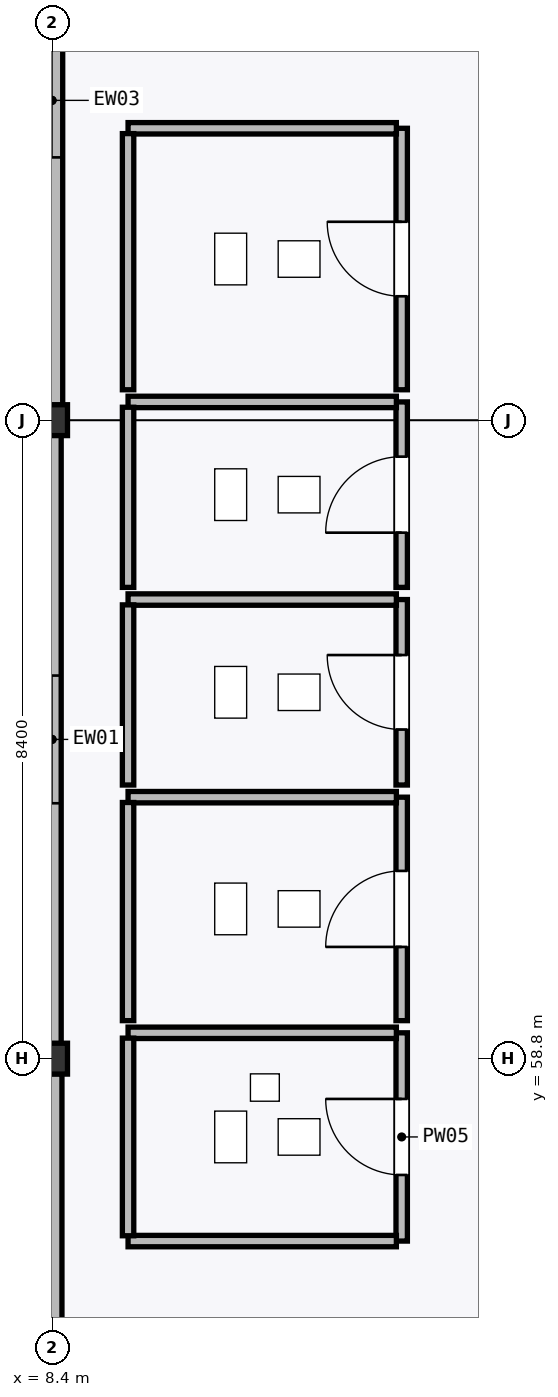
"""IFC4 building model, lengths in metres.
Left out: names, types, materials, properties, quantities, classifications, styles, units other than length and angle.
Written with IfcOpenShell. Run it as: python <this file> out.ifc"""

import sys

from ifc_helpers import new_model, si_unit, direction, frame, frame_2d, origin, origin_2d, place, context, subcontext, project, spatial, rectangle, hollow_circle, extrude, element, fill, save


model = new_model("IFC4")
c1 = context("Model", 3, precision=1e-05, world=origin(), true_north=direction((0.0, 1.0)))
c2 = subcontext(c1, "Body", "Model", "MODEL_VIEW")
j1 = project(units=[si_unit("LENGTHUNIT", "METRE"), si_unit("PLANEANGLEUNIT", "RADIAN")], contexts=[c1])
p1 = place(None, origin())
s1 = spatial("IfcSite", under=j1, at=p1, CompositionType="ELEMENT")
p2 = place(p1, origin())
s2 = spatial("IfcBuilding", under=s1, at=p2, CompositionType="ELEMENT")
p3 = place(p2, frame((0.0, 0.0, 6.0)))
s3 = spatial("IfcBuildingStorey", under=s2, at=p3, CompositionType="ELEMENT", Elevation=6.0)
for number, where, z_axis, x_axis in (
    (1, (8.4, 58.8, 0.0), (0.0, 0.0, 1.0), (1.0, 0.0, 0.0)),
    (2, (8.4, 67.2, 0.0), (0.0, 0.0, 1.0), (1.0, 0.0, 0.0)),
):
    element("IfcColumn", number, at=place(p3, frame(where, z_axis=z_axis, x_axis=x_axis)), inside=s3, PredefinedType="COLUMN", context=c2, shape_type="SweptSolid", body=[
        extrude(hollow_circle(Radius=0.203, WallThickness=0.016, at=origin_2d()), origin(), (0.0, 0.0, 1.0), 5.4),
    ])
p4 = place(p3, frame((8.4, 75.417, 0.0), z_axis=(0.0, 0.0, 1.0), x_axis=(0.0, -1.0, 0.0)))
e3 = element("IfcWall", 3, at=p4, inside=s3, PredefinedType="STANDARD", context=c2, shape_type="SweptSolid", body=[
    extrude(rectangle(XDim=8.019, YDim=0.28, at=frame_2d((4.009, 0.0))), origin(), (0.0, 0.0, 1.0), 4.697),
])
p5 = place(p4, frame((3.259, 0.0, 0.95)))
e4 = element("IfcOpeningElement", 4, at=p5, cuts=e3, PredefinedType="OPENING", context=c2, shape_type="SweptSolid", body=[
    extrude(rectangle(XDim=1.5, YDim=2.4, at=frame_2d((0.75, 1.2))), frame((0.0, 0.15, 0.0), z_axis=(0.0, -1.0, 0.0), x_axis=(1.0, 0.0, 0.0)), (0.0, 0.0, 1.0), 0.3),
])
p6 = place(p3, frame((8.4, 67.002, 0.0), z_axis=(0.0, 0.0, 1.0), x_axis=(0.0, -1.0, 0.0)))
e5 = element("IfcWall", 5, at=p6, inside=s3, PredefinedType="STANDARD", context=c2, shape_type="SweptSolid", body=[
    extrude(rectangle(XDim=8.004, YDim=0.24, at=frame_2d((4.002, 0.0))), origin(), (0.0, 0.0, 1.0), 4.697),
])
p7 = place(p6, frame((3.162, 0.0, 0.95)))
e6 = element("IfcOpeningElement", 6, at=p7, cuts=e5, PredefinedType="OPENING", context=c2, shape_type="SweptSolid", body=[
    extrude(rectangle(XDim=1.68, YDim=2.4, at=frame_2d((0.84, 1.2))), frame((0.0, 0.13, 0.0), z_axis=(0.0, -1.0, 0.0), x_axis=(1.0, 0.0, 0.0)), (0.0, 0.0, 1.0), 0.26),
])
p8 = place(p3, frame((8.4, 58.602, 0.0), z_axis=(0.0, 0.0, 1.0), x_axis=(0.0, -1.0, 0.0)))
e7 = element("IfcWall", 7, at=p8, inside=s3, PredefinedType="STANDARD", context=c2, shape_type="SweptSolid", body=[
    extrude(rectangle(XDim=8.019, YDim=0.26, at=frame_2d((4.009, 0.0))), origin(), (0.0, 0.0, 1.0), 4.697),
])
p9 = place(p8, frame((4.552, 0.0, 0.95)))
e8 = element("IfcOpeningElement", 8, at=p9, cuts=e7, PredefinedType="OPENING", context=c2, shape_type="SweptSolid", body=[
    extrude(rectangle(XDim=1.8, YDim=2.4, at=frame_2d((0.9, 1.2))), frame((0.0, 0.14, 0.0), z_axis=(0.0, -1.0, 0.0), x_axis=(1.0, 0.0, 0.0)), (0.0, 0.0, 1.0), 0.28),
])
p10 = place(p3, frame((13.0, 56.4, 0.0), z_axis=(0.0, 0.0, 1.0), x_axis=(0.0, 1.0, 0.0)))
e9 = element("IfcWall", 9, at=p10, inside=s3, PredefinedType="PARTITIONING", context=c2, shape_type="SweptSolid", body=[
    extrude(rectangle(XDim=2.74, YDim=0.15, at=frame_2d((1.37, 0.0))), origin(), (0.0, 0.0, 1.0), 5.145),
])
p11 = place(p10, frame((0.87, 0.0, 0.0)))
e10 = element("IfcOpeningElement", 10, at=p11, cuts=e9, PredefinedType="OPENING", context=c2, shape_type="SweptSolid", body=[
    extrude(rectangle(XDim=1.0, YDim=2.1, at=frame_2d((0.5, 1.05))), frame((0.0, 0.085, 0.0), z_axis=(0.0, -1.0, 0.0), x_axis=(1.0, 0.0, 0.0)), (0.0, 0.0, 1.0), 0.17),
])
p12 = place(p3, frame((9.4, 56.4, 0.0), z_axis=(0.0, 0.0, 1.0), x_axis=(1.0, 0.0, 0.0)))
e11 = element("IfcWall", 11, at=p12, inside=s3, PredefinedType="PARTITIONING", context=c2, shape_type="SweptSolid", body=[
    extrude(rectangle(XDim=3.53, YDim=0.15, at=frame_2d((1.765, 0.0))), origin(), (0.0, 0.0, 1.0), 5.145),
])
p13 = place(p3, frame((12.93, 59.14, 0.0), z_axis=(0.0, 0.0, 1.0), x_axis=(-1.0, 0.0, 0.0)))
e12 = element("IfcWall", 12, at=p13, inside=s3, PredefinedType="PARTITIONING", context=c2, shape_type="SweptSolid", body=[
    extrude(rectangle(XDim=3.53, YDim=0.15, at=frame_2d((1.765, 0.0))), origin(), (0.0, 0.0, 1.0), 4.237),
])
p14 = place(p3, frame((9.4, 59.07, 0.0), z_axis=(0.0, 0.0, 1.0), x_axis=(0.0, -1.0, 0.0)))
e13 = element("IfcWall", 13, at=p14, inside=s3, PredefinedType="PARTITIONING", context=c2, shape_type="SweptSolid", body=[
    extrude(rectangle(XDim=2.6, YDim=0.15, at=frame_2d((1.3, 0.0))), origin(), (0.0, 0.0, 1.0), 5.145),
])
p15 = place(p3, frame((13.0, 59.3, 0.0), z_axis=(0.0, 0.0, 1.0), x_axis=(0.0, 1.0, 0.0)))
e14 = element("IfcWall", 14, at=p15, inside=s3, PredefinedType="PARTITIONING", context=c2, shape_type="SweptSolid", body=[
    extrude(rectangle(XDim=2.94, YDim=0.15, at=frame_2d((1.47, 0.0))), origin(), (0.0, 0.0, 1.0), 5.145),
])
p16 = place(p15, frame((0.97, 0.0, 0.0)))
e15 = element("IfcOpeningElement", 15, at=p16, cuts=e14, PredefinedType="OPENING", context=c2, shape_type="SweptSolid", body=[
    extrude(rectangle(XDim=1.0, YDim=2.1, at=frame_2d((0.5, 1.05))), frame((0.0, 0.085, 0.0), z_axis=(0.0, -1.0, 0.0), x_axis=(1.0, 0.0, 0.0)), (0.0, 0.0, 1.0), 0.17),
])
p17 = place(p3, frame((12.93, 62.24, 0.0), z_axis=(0.0, 0.0, 1.0), x_axis=(-1.0, 0.0, 0.0)))
e16 = element("IfcWall", 16, at=p17, inside=s3, PredefinedType="PARTITIONING", context=c2, shape_type="SweptSolid", body=[
    extrude(rectangle(XDim=3.53, YDim=0.15, at=frame_2d((1.765, 0.0))), origin(), (0.0, 0.0, 1.0), 5.145),
])
p18 = place(p3, frame((9.4, 62.17, 0.0), z_axis=(0.0, 0.0, 1.0), x_axis=(0.0, -1.0, 0.0)))
e17 = element("IfcWall", 17, at=p18, inside=s3, PredefinedType="PARTITIONING", context=c2, shape_type="SweptSolid", body=[
    extrude(rectangle(XDim=2.87, YDim=0.15, at=frame_2d((1.435, 0.0))), origin(), (0.0, 0.0, 1.0), 5.145),
])
p19 = place(p3, frame((13.0, 62.4, 0.0), z_axis=(0.0, 0.0, 1.0), x_axis=(0.0, 1.0, 0.0)))
e18 = element("IfcWall", 18, at=p19, inside=s3, PredefinedType="PARTITIONING", context=c2, shape_type="SweptSolid", body=[
    extrude(rectangle(XDim=2.44, YDim=0.15, at=frame_2d((1.22, 0.0))), origin(), (0.0, 0.0, 1.0), 5.145),
])
p20 = place(p19, frame((0.73, 0.0, 0.0)))
e19 = element("IfcOpeningElement", 19, at=p20, cuts=e18, PredefinedType="OPENING", context=c2, shape_type="SweptSolid", body=[
    extrude(rectangle(XDim=0.98, YDim=2.1, at=frame_2d((0.49, 1.05))), frame((0.0, 0.085, 0.0), z_axis=(0.0, -1.0, 0.0), x_axis=(1.0, 0.0, 0.0)), (0.0, 0.0, 1.0), 0.17),
])
p21 = place(p3, frame((12.93, 64.84, 0.0), z_axis=(0.0, 0.0, 1.0), x_axis=(-1.0, 0.0, 0.0)))
e20 = element("IfcWall", 20, at=p21, inside=s3, PredefinedType="PARTITIONING", context=c2, shape_type="SweptSolid", body=[
    extrude(rectangle(XDim=3.53, YDim=0.15, at=frame_2d((1.765, 0.0))), origin(), (0.0, 0.0, 1.0), 5.145),
])
p22 = place(p3, frame((9.4, 64.77, 0.0), z_axis=(0.0, 0.0, 1.0), x_axis=(0.0, -1.0, 0.0)))
e21 = element("IfcWall", 21, at=p22, inside=s3, PredefinedType="PARTITIONING", context=c2, shape_type="SweptSolid", body=[
    extrude(rectangle(XDim=2.37, YDim=0.15, at=frame_2d((1.185, 0.0))), origin(), (0.0, 0.0, 1.0), 5.145),
])
p23 = place(p3, frame((13.0, 65.0, 0.0), z_axis=(0.0, 0.0, 1.0), x_axis=(0.0, 1.0, 0.0)))
e22 = element("IfcWall", 22, at=p23, inside=s3, PredefinedType="PARTITIONING", context=c2, shape_type="SweptSolid", body=[
    extrude(rectangle(XDim=2.44, YDim=0.15, at=frame_2d((1.22, 0.0))), origin(), (0.0, 0.0, 1.0), 5.145),
])
p24 = place(p23, frame((0.72, 0.0, 0.0)))
e23 = element("IfcOpeningElement", 23, at=p24, cuts=e22, PredefinedType="OPENING", context=c2, shape_type="SweptSolid", body=[
    extrude(rectangle(XDim=1.0, YDim=2.1, at=frame_2d((0.5, 1.05))), frame((0.0, 0.085, 0.0), z_axis=(0.0, -1.0, 0.0), x_axis=(1.0, 0.0, 0.0)), (0.0, 0.0, 1.0), 0.17),
])
p25 = place(p3, frame((12.93, 67.44, 0.0), z_axis=(0.0, 0.0, 1.0), x_axis=(-1.0, 0.0, 0.0)))
e24 = element("IfcWall", 24, at=p25, inside=s3, PredefinedType="PARTITIONING", context=c2, shape_type="SweptSolid", body=[
    extrude(rectangle(XDim=3.53, YDim=0.15, at=frame_2d((1.765, 0.0))), origin(), (0.0, 0.0, 1.0), 4.549),
])
p26 = place(p3, frame((9.4, 67.37, 0.0), z_axis=(0.0, 0.0, 1.0), x_axis=(0.0, -1.0, 0.0)))
e25 = element("IfcWall", 25, at=p26, inside=s3, PredefinedType="PARTITIONING", context=c2, shape_type="SweptSolid", body=[
    extrude(rectangle(XDim=2.37, YDim=0.15, at=frame_2d((1.185, 0.0))), origin(), (0.0, 0.0, 1.0), 5.145),
])
p27 = place(p3, frame((13.0, 67.6, 0.0), z_axis=(0.0, 0.0, 1.0), x_axis=(0.0, 1.0, 0.0)))
e26 = element("IfcWall", 26, at=p27, inside=s3, PredefinedType="PARTITIONING", context=c2, shape_type="SweptSolid", body=[
    extrude(rectangle(XDim=3.44, YDim=0.15, at=frame_2d((1.72, 0.0))), origin(), (0.0, 0.0, 1.0), 5.145),
])
p28 = place(p27, frame((1.23, 0.0, 0.0)))
e27 = element("IfcOpeningElement", 27, at=p28, cuts=e26, PredefinedType="OPENING", context=c2, shape_type="SweptSolid", body=[
    extrude(rectangle(XDim=0.98, YDim=2.1, at=frame_2d((0.49, 1.05))), frame((0.0, 0.085, 0.0), z_axis=(0.0, -1.0, 0.0), x_axis=(1.0, 0.0, 0.0)), (0.0, 0.0, 1.0), 0.17),
])
p29 = place(p3, frame((12.93, 71.04, 0.0), z_axis=(0.0, 0.0, 1.0), x_axis=(-1.0, 0.0, 0.0)))
e28 = element("IfcWall", 28, at=p29, inside=s3, PredefinedType="PARTITIONING", context=c2, shape_type="SweptSolid", body=[
    extrude(rectangle(XDim=3.53, YDim=0.15, at=frame_2d((1.765, 0.0))), origin(), (0.0, 0.0, 1.0), 5.145),
])
p30 = place(p3, frame((9.4, 70.97, 0.0), z_axis=(0.0, 0.0, 1.0), x_axis=(0.0, -1.0, 0.0)))
e29 = element("IfcWall", 29, at=p30, inside=s3, PredefinedType="PARTITIONING", context=c2, shape_type="SweptSolid", body=[
    extrude(rectangle(XDim=3.37, YDim=0.15, at=frame_2d((1.685, 0.0))), origin(), (0.0, 0.0, 1.0), 5.145),
])
p31 = place(p5, origin())
e30 = element("IfcWindow", 30, at=p31, inside=s3, PartitioningType="SINGLE_PANEL", PredefinedType="WINDOW", context=c2, shape_type="SweptSolid", body=[
    extrude(rectangle(XDim=1.5, YDim=2.4, at=frame_2d((0.75, 1.2))), frame((0.0, 0.03, 0.0), z_axis=(0.0, -1.0, 0.0), x_axis=(1.0, 0.0, 0.0)), (0.0, 0.0, 1.0), 0.06),
])
fill(e4, e30)
p32 = place(p7, origin())
e31 = element("IfcWindow", 31, at=p32, inside=s3, PartitioningType="SINGLE_PANEL", PredefinedType="WINDOW", context=c2, shape_type="SweptSolid", body=[
    extrude(rectangle(XDim=1.68, YDim=2.4, at=frame_2d((0.84, 1.2))), frame((0.0, 0.03, 0.0), z_axis=(0.0, -1.0, 0.0), x_axis=(1.0, 0.0, 0.0)), (0.0, 0.0, 1.0), 0.06),
])
fill(e6, e31)
p33 = place(p11, origin())
e32 = element("IfcDoor", 32, at=p33, inside=s3, OperationType="SINGLE_SWING_RIGHT", PredefinedType="DOOR", context=c2, shape_type="SweptSolid", body=[
    extrude(rectangle(XDim=1.0, YDim=2.1, at=frame_2d((0.5, 1.05))), frame((0.0, 0.025, 0.0), z_axis=(0.0, -1.0, 0.0), x_axis=(1.0, 0.0, 0.0)), (0.0, 0.0, 1.0), 0.05),
])
fill(e10, e32)
p34 = place(p16, origin())
e33 = element("IfcDoor", 33, at=p34, inside=s3, OperationType="SINGLE_SWING_LEFT", PredefinedType="DOOR", context=c2, shape_type="SweptSolid", body=[
    extrude(rectangle(XDim=1.0, YDim=2.1, at=frame_2d((0.5, 1.05))), frame((0.0, 0.025, 0.0), z_axis=(0.0, -1.0, 0.0), x_axis=(1.0, 0.0, 0.0)), (0.0, 0.0, 1.0), 0.05),
])
fill(e15, e33)
p35 = place(p20, origin())
e34 = element("IfcDoor", 34, at=p35, inside=s3, OperationType="SINGLE_SWING_RIGHT", PredefinedType="DOOR", context=c2, shape_type="SweptSolid", body=[
    extrude(rectangle(XDim=0.98, YDim=2.1, at=frame_2d((0.49, 1.05))), frame((0.0, 0.025, 0.0), z_axis=(0.0, -1.0, 0.0), x_axis=(1.0, 0.0, 0.0)), (0.0, 0.0, 1.0), 0.05),
])
fill(e19, e34)
p36 = place(p24, origin())
e35 = element("IfcDoor", 35, at=p36, inside=s3, OperationType="SINGLE_SWING_LEFT", PredefinedType="DOOR", context=c2, shape_type="SweptSolid", body=[
    extrude(rectangle(XDim=1.0, YDim=2.1, at=frame_2d((0.5, 1.05))), frame((0.0, 0.025, 0.0), z_axis=(0.0, -1.0, 0.0), x_axis=(1.0, 0.0, 0.0)), (0.0, 0.0, 1.0), 0.05),
])
fill(e23, e35)
p37 = place(p28, origin())
e36 = element("IfcDoor", 36, at=p37, inside=s3, OperationType="SINGLE_SWING_RIGHT", PredefinedType="DOOR", context=c2, shape_type="SweptSolid", body=[
    extrude(rectangle(XDim=0.98, YDim=2.1, at=frame_2d((0.49, 1.05))), frame((0.0, 0.025, 0.0), z_axis=(0.0, -1.0, 0.0), x_axis=(1.0, 0.0, 0.0)), (0.0, 0.0, 1.0), 0.05),
])
fill(e27, e36)
save(model, sys.argv[1])
